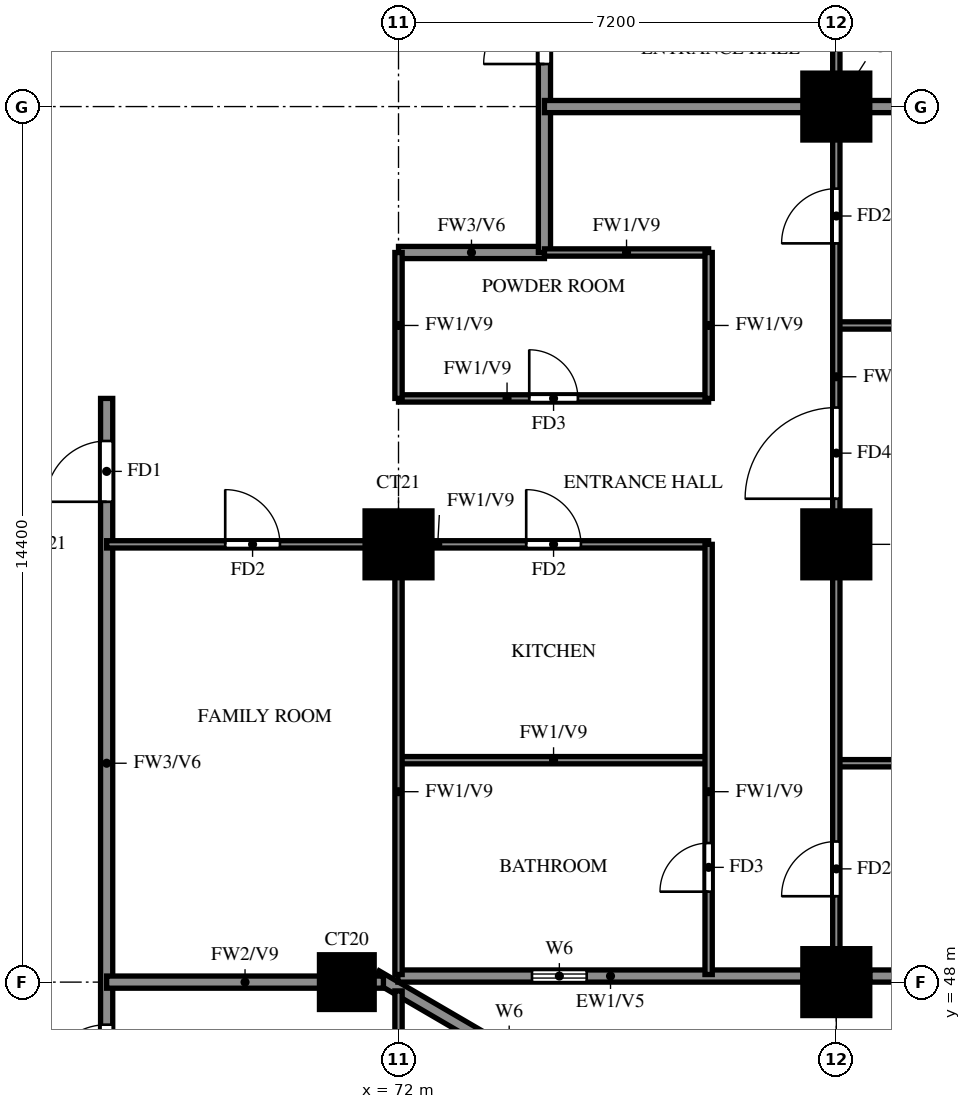
"""IFC4 building model, lengths in metres.
Left out: names, types, materials, properties, quantities, classifications, styles, units other than length and angle.
Written with IfcOpenShell. Run it as: python <this file> out.ifc"""

import sys

from ifc_helpers import new_model, si_unit, direction, frame, frame_2d, origin, origin_2d, place, context, subcontext, project, spatial, rectangle, extrude, source, transform, mapped, element, fill, save


model = new_model("IFC4")
c1 = context("Model", 3, precision=1e-05, world=origin(), true_north=direction((0.0, 1.0)))
c2 = subcontext(c1, "Body", "Model", "MODEL_VIEW")
j1 = project(units=[si_unit("LENGTHUNIT", "METRE"), si_unit("PLANEANGLEUNIT", "RADIAN")], contexts=[c1])
p1 = place(None, origin())
s1 = spatial("IfcSite", under=j1, at=p1, CompositionType="ELEMENT")
p2 = place(p1, origin())
s2 = spatial("IfcBuilding", under=s1, at=p2, CompositionType="ELEMENT")
p3 = place(p2, frame((0.0, 0.0, 134.0)))
s3 = spatial("IfcBuildingStorey", under=s2, at=p3, CompositionType="ELEMENT", Elevation=134.0)
m1 = source(origin(), c2, "Body", "SweptSolid", [
    extrude(rectangle(XDim=0.9, YDim=0.9, at=origin_2d()), origin(), (0.0, 0.0, 1.0), 3.15),
])
p4 = place(p3, frame((71.15, 48.0, 0.0), z_axis=(0.0, 0.0, 1.0), x_axis=(1.0, 0.0, 0.0)))
e1 = element("IfcColumn", 1, at=p4, inside=s3, PredefinedType="COLUMN", context=c2, shape_type="MappedRepresentation", body=[
    mapped(m1, transform((0.0, 0.0, 0.0))),
])
m2 = source(origin(), c2, "Body", "SweptSolid", [
    extrude(rectangle(XDim=1.1, YDim=1.1, at=origin_2d()), origin(), (0.0, 0.0, 1.0), 3.15),
])
for number, where, z_axis, x_axis in (
    (2, (79.2, 48.0, 0.0), (0.0, 0.0, 1.0), (1.0, 0.0, 0.0)),
    (3, (72.0, 55.2, 0.0), (0.0, 0.0, 1.0), (1.0, 0.0, 0.0)),
    (4, (79.2, 55.2, 0.0), (0.0, 0.0, 1.0), (1.0, 0.0, 0.0)),
    (5, (79.2, 62.4, 0.0), (0.0, 0.0, 1.0), (1.0, 0.0, 0.0)),
):
    element("IfcColumn", number, at=place(p3, frame(where, z_axis=z_axis, x_axis=x_axis)), inside=s3, PredefinedType="COLUMN", context=c2, shape_type="MappedRepresentation", body=[
        mapped(m2, transform((0.0, 0.0, 0.0))),
    ])
p5 = place(p3, frame((85.719, 39.881, 0.0), z_axis=(0.0, 0.0, 1.0), x_axis=(-0.86377618652, 0.503875678716, 0.0)))
e6 = element("IfcWall", 6, at=p5, inside=s3, PredefinedType="SOLIDWALL", context=c2, shape_type="SweptSolid", body=[
    extrude(rectangle(XDim=16.311, YDim=0.2, at=frame_2d((8.156, 0.0))), origin(), (0.0, 0.0, 1.0), 3.15),
])
p6 = place(p5, frame((13.326, 0.0, 1.5)))
e7 = element("IfcOpeningElement", 7, at=p6, cuts=e6, PredefinedType="OPENING", context=c2, shape_type="SweptSolid", body=[
    extrude(rectangle(XDim=0.9, YDim=0.9, at=frame_2d((0.45, 0.45))), frame((0.0, 0.11, 0.0), z_axis=(0.0, -1.0, 0.0), x_axis=(1.0, 0.0, 0.0)), (0.0, 0.0, 1.0), 0.22),
])
p7 = place(p3, frame((71.99, 48.1, 0.0), z_axis=(0.0, 0.0, 1.0), x_axis=(1.0, 0.0, 0.0)))
e8 = element("IfcWall", 8, at=p7, inside=s3, PredefinedType="SOLIDWALL", context=c2, shape_type="SweptSolid", body=[
    extrude(rectangle(XDim=6.66, YDim=0.2, at=frame_2d((3.33, 0.0))), origin(), (0.0, 0.0, 1.0), 3.15),
])
p8 = place(p7, frame((2.205, 0.0, 1.5)))
e9 = element("IfcOpeningElement", 9, at=p8, cuts=e8, PredefinedType="OPENING", context=c2, shape_type="SweptSolid", body=[
    extrude(rectangle(XDim=0.9, YDim=0.9, at=frame_2d((0.45, 0.45))), frame((0.0, 0.11, 0.0), z_axis=(0.0, -1.0, 0.0), x_axis=(1.0, 0.0, 0.0)), (0.0, 0.0, 1.0), 0.22),
])
p9 = place(p3, frame((79.75, 48.1, 0.0), z_axis=(0.0, 0.0, 1.0), x_axis=(1.0, 0.0, 0.0)))
e10 = element("IfcWall", 10, at=p9, inside=s3, PredefinedType="SOLIDWALL", context=c2, shape_type="SweptSolid", body=[
    extrude(rectangle(XDim=5.6, YDim=0.2, at=frame_2d((2.8, 0.0))), origin(), (0.0, 0.0, 1.0), 3.15),
])
p10 = place(p9, frame((1.6, 0.0, 0.6)))
e11 = element("IfcOpeningElement", 11, at=p10, cuts=e10, PredefinedType="OPENING", context=c2, shape_type="SweptSolid", body=[
    extrude(rectangle(XDim=2.4, YDim=2.4, at=frame_2d((1.2, 1.2))), frame((0.0, 0.11, 0.0), z_axis=(0.0, -1.0, 0.0), x_axis=(1.0, 0.0, 0.0)), (0.0, 0.0, 1.0), 0.22),
])
p11 = place(p3, frame((72.0, 60.0, 0.0), z_axis=(0.0, 0.0, 1.0), x_axis=(1.0, 0.0, 0.0)))
e12 = element("IfcWall", 12, at=p11, inside=s3, PredefinedType="SOLIDWALL", context=c2, shape_type="SweptSolid", body=[
    extrude(rectangle(XDim=2.4, YDim=0.2, at=frame_2d((1.2, 0.0))), origin(), (0.0, 0.0, 1.0), 3.15),
])
p12 = place(p3, frame((67.2, 45.6, 0.0), z_axis=(0.0, 0.0, 1.0), x_axis=(0.0, 1.0, 0.0)))
e13 = element("IfcWall", 13, at=p12, inside=s3, PredefinedType="SOLIDWALL", context=c2, shape_type="SweptSolid", body=[
    extrude(rectangle(XDim=12.0, YDim=0.2, at=frame_2d((6.0, 0.0))), origin(), (0.0, 0.0, 1.0), 3.15),
])
p13 = place(p12, frame((10.3, 0.0, 0.0)))
e14 = element("IfcOpeningElement", 14, at=p13, cuts=e13, PredefinedType="OPENING", context=c2, shape_type="SweptSolid", body=[
    extrude(rectangle(XDim=1.0, YDim=2.1, at=frame_2d((0.5, 1.05))), frame((0.0, 0.11, 0.0), z_axis=(0.0, -1.0, 0.0), x_axis=(1.0, 0.0, 0.0)), (0.0, 0.0, 1.0), 0.22),
])
p14 = place(p12, frame((0.7, 0.0, 0.0)))
e15 = element("IfcOpeningElement", 15, at=p14, cuts=e13, PredefinedType="OPENING", context=c2, shape_type="SweptSolid", body=[
    extrude(rectangle(XDim=1.0, YDim=2.1, at=frame_2d((0.5, 1.05))), frame((0.0, 0.11, 0.0), z_axis=(0.0, -1.0, 0.0), x_axis=(1.0, 0.0, 0.0)), (0.0, 0.0, 1.0), 0.22),
])
p15 = place(p3, frame((74.4, 60.0, 0.0), z_axis=(0.0, 0.0, 1.0), x_axis=(0.0, 1.0, 0.0)))
e16 = element("IfcWall", 16, at=p15, inside=s3, PredefinedType="SOLIDWALL", context=c2, shape_type="SweptSolid", body=[
    extrude(rectangle(XDim=9.45, YDim=0.2, at=frame_2d((4.725, 0.0))), origin(), (0.0, 0.0, 1.0), 3.15),
])
p16 = place(p15, frame((3.1, 0.0, 0.0)))
e17 = element("IfcOpeningElement", 17, at=p16, cuts=e16, PredefinedType="OPENING", context=c2, shape_type="SweptSolid", body=[
    extrude(rectangle(XDim=1.0, YDim=2.1, at=frame_2d((0.5, 1.05))), frame((0.0, 0.11, 0.0), z_axis=(0.0, -1.0, 0.0), x_axis=(1.0, 0.0, 0.0)), (0.0, 0.0, 1.0), 0.22),
])
p17 = place(p3, frame((67.2, 48.0, 0.0), z_axis=(0.0, 0.0, 1.0), x_axis=(1.0, 0.0, 0.0)))
e18 = element("IfcWall", 18, at=p17, inside=s3, PredefinedType="SOLIDWALL", context=c2, shape_type="SweptSolid", body=[
    extrude(rectangle(XDim=4.552, YDim=0.2, at=frame_2d((2.276, 0.0))), origin(), (0.0, 0.0, 1.0), 3.15),
])
p18 = place(p3, frame((74.4, 62.4, 0.0), z_axis=(0.0, 0.0, 1.0), x_axis=(1.0, 0.0, 0.0)))
e19 = element("IfcWall", 19, at=p18, inside=s3, PredefinedType="SOLIDWALL", context=c2, shape_type="SweptSolid", body=[
    extrude(rectangle(XDim=11.875, YDim=0.2, at=frame_2d((5.938, 0.0))), origin(), (0.0, 0.0, 1.0), 3.15),
])
p19 = place(p3, frame((79.2, 51.6, 0.0), z_axis=(0.0, 0.0, 1.0), x_axis=(1.0, 0.0, 0.0)))
e20 = element("IfcWall", 20, at=p19, inside=s3, PredefinedType="PARTITIONING", context=c2, shape_type="SweptSolid", body=[
    extrude(rectangle(XDim=7.075, YDim=0.12, at=frame_2d((3.538, 0.0))), origin(), (0.0, 0.0, 1.0), 2.25),
])
p20 = place(p3, frame((72.0, 51.65, 0.0), z_axis=(0.0, 0.0, 1.0), x_axis=(1.0, 0.0, 0.0)))
e21 = element("IfcWall", 21, at=p20, inside=s3, PredefinedType="PARTITIONING", context=c2, shape_type="SweptSolid", body=[
    extrude(rectangle(XDim=5.1, YDim=0.12, at=frame_2d((2.55, 0.0))), origin(), (0.0, 0.0, 1.0), 3.15),
])
p21 = place(p3, frame((67.2, 55.2, 0.0), z_axis=(0.0, 0.0, 1.0), x_axis=(1.0, 0.0, 0.0)))
e22 = element("IfcWall", 22, at=p21, inside=s3, PredefinedType="PARTITIONING", context=c2, shape_type="SweptSolid", body=[
    extrude(rectangle(XDim=9.9, YDim=0.12, at=frame_2d((4.95, 0.0))), origin(), (0.0, 0.0, 1.0), 3.15),
])
p22 = place(p21, frame((6.9, 0.0, 0.0)))
e23 = element("IfcOpeningElement", 23, at=p22, cuts=e22, PredefinedType="OPENING", context=c2, shape_type="SweptSolid", body=[
    extrude(rectangle(XDim=0.9, YDim=2.1, at=frame_2d((0.45, 1.05))), frame((0.0, 0.07, 0.0), z_axis=(0.0, -1.0, 0.0), x_axis=(1.0, 0.0, 0.0)), (0.0, 0.0, 1.0), 0.14),
])
p23 = place(p21, frame((1.95, 0.0, 0.0)))
e24 = element("IfcOpeningElement", 24, at=p23, cuts=e22, PredefinedType="OPENING", context=c2, shape_type="SweptSolid", body=[
    extrude(rectangle(XDim=0.9, YDim=2.1, at=frame_2d((0.45, 1.05))), frame((0.0, 0.07, 0.0), z_axis=(0.0, -1.0, 0.0), x_axis=(1.0, 0.0, 0.0)), (0.0, 0.0, 1.0), 0.14),
])
p24 = place(p3, frame((72.0, 57.6, 0.0), z_axis=(0.0, 0.0, 1.0), x_axis=(1.0, 0.0, 0.0)))
e25 = element("IfcWall", 25, at=p24, inside=s3, PredefinedType="PARTITIONING", context=c2, shape_type="SweptSolid", body=[
    extrude(rectangle(XDim=5.1, YDim=0.12, at=frame_2d((2.55, 0.0))), origin(), (0.0, 0.0, 1.0), 3.15),
])
p25 = place(p24, frame((2.15, 0.0, 0.0)))
e26 = element("IfcOpeningElement", 26, at=p25, cuts=e25, PredefinedType="OPENING", context=c2, shape_type="SweptSolid", body=[
    extrude(rectangle(XDim=0.8, YDim=2.1, at=frame_2d((0.4, 1.05))), frame((0.0, 0.07, 0.0), z_axis=(0.0, -1.0, 0.0), x_axis=(1.0, 0.0, 0.0)), (0.0, 0.0, 1.0), 0.14),
])
p26 = place(p3, frame((79.2, 58.8, 0.0), z_axis=(0.0, 0.0, 1.0), x_axis=(1.0, 0.0, 0.0)))
e27 = element("IfcWall", 27, at=p26, inside=s3, PredefinedType="PARTITIONING", context=c2, shape_type="SweptSolid", body=[
    extrude(rectangle(XDim=7.075, YDim=0.12, at=frame_2d((3.538, 0.0))), origin(), (0.0, 0.0, 1.0), 2.25),
])
p27 = place(p3, frame((74.4, 60.0, 0.0), z_axis=(0.0, 0.0, 1.0), x_axis=(1.0, 0.0, 0.0)))
e28 = element("IfcWall", 28, at=p27, inside=s3, PredefinedType="PARTITIONING", context=c2, shape_type="SweptSolid", body=[
    extrude(rectangle(XDim=2.7, YDim=0.12, at=frame_2d((1.35, 0.0))), origin(), (0.0, 0.0, 1.0), 3.15),
])
p28 = place(p3, frame((72.0, 39.725, 0.0), z_axis=(0.0, 0.0, 1.0), x_axis=(0.0, 1.0, 0.0)))
e29 = element("IfcWall", 29, at=p28, inside=s3, PredefinedType="PARTITIONING", context=c2, shape_type="SweptSolid", body=[
    extrude(rectangle(XDim=8.13, YDim=0.12, at=frame_2d((4.065, 0.0))), origin(), (0.0, 0.0, 1.0), 2.25),
])
p29 = place(p28, frame((1.788, 0.0, 0.0)))
e30 = element("IfcOpeningElement", 30, at=p29, cuts=e29, PredefinedType="OPENING", context=c2, shape_type="SweptSolid", body=[
    extrude(rectangle(XDim=0.9, YDim=2.1, at=frame_2d((0.45, 1.05))), frame((0.0, 0.07, 0.0), z_axis=(0.0, -1.0, 0.0), x_axis=(1.0, 0.0, 0.0)), (0.0, 0.0, 1.0), 0.14),
])
p30 = place(p28, frame((4.575, 0.0, 0.0)))
e31 = element("IfcOpeningElement", 31, at=p30, cuts=e29, PredefinedType="OPENING", context=c2, shape_type="SweptSolid", body=[
    extrude(rectangle(XDim=0.8, YDim=2.1, at=frame_2d((0.4, 1.05))), frame((0.0, 0.07, 0.0), z_axis=(0.0, -1.0, 0.0), x_axis=(1.0, 0.0, 0.0)), (0.0, 0.0, 1.0), 0.14),
])
p31 = place(p3, frame((72.0, 48.125, 0.0), z_axis=(0.0, 0.0, 1.0), x_axis=(0.0, 1.0, 0.0)))
e32 = element("IfcWall", 32, at=p31, inside=s3, PredefinedType="PARTITIONING", context=c2, shape_type="SweptSolid", body=[
    extrude(rectangle(XDim=7.075, YDim=0.12, at=frame_2d((3.538, 0.0))), origin(), (0.0, 0.0, 1.0), 3.15),
])
p32 = place(p3, frame((72.0, 57.6, 0.0), z_axis=(0.0, 0.0, 1.0), x_axis=(0.0, 1.0, 0.0)))
e33 = element("IfcWall", 33, at=p32, inside=s3, PredefinedType="PARTITIONING", context=c2, shape_type="SweptSolid", body=[
    extrude(rectangle(XDim=2.4, YDim=0.12, at=frame_2d((1.2, 0.0))), origin(), (0.0, 0.0, 1.0), 3.15),
])
p33 = place(p3, frame((77.1, 48.125, 0.0), z_axis=(0.0, 0.0, 1.0), x_axis=(0.0, 1.0, 0.0)))
e34 = element("IfcWall", 34, at=p33, inside=s3, PredefinedType="PARTITIONING", context=c2, shape_type="SweptSolid", body=[
    extrude(rectangle(XDim=7.075, YDim=0.12, at=frame_2d((3.538, 0.0))), origin(), (0.0, 0.0, 1.0), 3.15),
])
p34 = place(p33, frame((1.363, 0.0, 0.0)))
e35 = element("IfcOpeningElement", 35, at=p34, cuts=e34, PredefinedType="OPENING", context=c2, shape_type="SweptSolid", body=[
    extrude(rectangle(XDim=0.8, YDim=2.1, at=frame_2d((0.4, 1.05))), frame((0.0, 0.07, 0.0), z_axis=(0.0, -1.0, 0.0), x_axis=(1.0, 0.0, 0.0)), (0.0, 0.0, 1.0), 0.14),
])
p35 = place(p3, frame((77.1, 57.6, 0.0), z_axis=(0.0, 0.0, 1.0), x_axis=(0.0, 1.0, 0.0)))
e36 = element("IfcWall", 36, at=p35, inside=s3, PredefinedType="PARTITIONING", context=c2, shape_type="SweptSolid", body=[
    extrude(rectangle(XDim=2.4, YDim=0.12, at=frame_2d((1.2, 0.0))), origin(), (0.0, 0.0, 1.0), 3.15),
])
p36 = place(p3, frame((79.2, 48.125, 0.0), z_axis=(0.0, 0.0, 1.0), x_axis=(0.0, 1.0, 0.0)))
e37 = element("IfcWall", 37, at=p36, inside=s3, PredefinedType="PARTITIONING", context=c2, shape_type="SweptSolid", body=[
    extrude(rectangle(XDim=17.875, YDim=0.12, at=frame_2d((8.938, 0.0))), origin(), (0.0, 0.0, 1.0), 3.15),
])
p37 = place(p36, frame((1.288, 0.0, 0.0)))
e38 = element("IfcOpeningElement", 38, at=p37, cuts=e37, PredefinedType="OPENING", context=c2, shape_type="SweptSolid", body=[
    extrude(rectangle(XDim=0.9, YDim=2.1, at=frame_2d((0.45, 1.05))), frame((0.0, 0.07, 0.0), z_axis=(0.0, -1.0, 0.0), x_axis=(1.0, 0.0, 0.0)), (0.0, 0.0, 1.0), 0.14),
])
p38 = place(p36, frame((7.825, 0.0, 0.0)))
e39 = element("IfcOpeningElement", 39, at=p38, cuts=e37, PredefinedType="OPENING", context=c2, shape_type="SweptSolid", body=[
    extrude(rectangle(XDim=1.5, YDim=2.1, at=frame_2d((0.75, 1.05))), frame((0.0, 0.07, 0.0), z_axis=(0.0, -1.0, 0.0), x_axis=(1.0, 0.0, 0.0)), (0.0, 0.0, 1.0), 0.14),
])
p39 = place(p36, frame((12.025, 0.0, 0.0)))
e40 = element("IfcOpeningElement", 40, at=p39, cuts=e37, PredefinedType="OPENING", context=c2, shape_type="SweptSolid", body=[
    extrude(rectangle(XDim=0.9, YDim=2.1, at=frame_2d((0.45, 1.05))), frame((0.0, 0.07, 0.0), z_axis=(0.0, -1.0, 0.0), x_axis=(1.0, 0.0, 0.0)), (0.0, 0.0, 1.0), 0.14),
])
p40 = place(p36, frame((15.625, 0.0, 0.0)))
e41 = element("IfcOpeningElement", 41, at=p40, cuts=e37, PredefinedType="OPENING", context=c2, shape_type="SweptSolid", body=[
    extrude(rectangle(XDim=0.9, YDim=2.1, at=frame_2d((0.45, 1.05))), frame((0.0, 0.07, 0.0), z_axis=(0.0, -1.0, 0.0), x_axis=(1.0, 0.0, 0.0)), (0.0, 0.0, 1.0), 0.14),
])
p41 = place(p8, origin())
e42 = element("IfcWindow", 42, at=p41, inside=s3, PartitioningType="SINGLE_PANEL", PredefinedType="WINDOW", context=c2, shape_type="SweptSolid", body=[
    extrude(rectangle(XDim=0.9, YDim=0.9, at=frame_2d((0.45, 0.45))), frame((0.0, 0.03, 0.0), z_axis=(0.0, -1.0, 0.0), x_axis=(1.0, 0.0, 0.0)), (0.0, 0.0, 1.0), 0.06),
])
fill(e9, e42)
p42 = place(p13, origin())
e43 = element("IfcDoor", 43, at=p42, inside=s3, OperationType="SINGLE_SWING_LEFT", PredefinedType="DOOR", context=c2, shape_type="SweptSolid", body=[
    extrude(rectangle(XDim=1.0, YDim=2.1, at=frame_2d((0.5, 1.05))), frame((0.0, 0.025, 0.0), z_axis=(0.0, -1.0, 0.0), x_axis=(1.0, 0.0, 0.0)), (0.0, 0.0, 1.0), 0.05),
])
fill(e14, e43)
p43 = place(p37, origin())
e44 = element("IfcDoor", 44, at=p43, inside=s3, OperationType="SINGLE_SWING_RIGHT", PredefinedType="DOOR", context=c2, shape_type="SweptSolid", body=[
    extrude(rectangle(XDim=0.9, YDim=2.1, at=frame_2d((0.45, 1.05))), frame((0.0, 0.025, 0.0), z_axis=(0.0, -1.0, 0.0), x_axis=(1.0, 0.0, 0.0)), (0.0, 0.0, 1.0), 0.05),
])
fill(e38, e44)
p44 = place(p38, origin())
e45 = element("IfcDoor", 45, at=p44, inside=s3, OperationType="SINGLE_SWING_RIGHT", PredefinedType="DOOR", context=c2, shape_type="SweptSolid", body=[
    extrude(rectangle(XDim=1.5, YDim=2.1, at=frame_2d((0.75, 1.05))), frame((0.0, 0.025, 0.0), z_axis=(0.0, -1.0, 0.0), x_axis=(1.0, 0.0, 0.0)), (0.0, 0.0, 1.0), 0.05),
])
fill(e39, e45)
p45 = place(p39, origin())
e46 = element("IfcDoor", 46, at=p45, inside=s3, OperationType="SINGLE_SWING_LEFT", PredefinedType="DOOR", context=c2, shape_type="SweptSolid", body=[
    extrude(rectangle(XDim=0.9, YDim=2.1, at=frame_2d((0.45, 1.05))), frame((0.0, 0.025, 0.0), z_axis=(0.0, -1.0, 0.0), x_axis=(1.0, 0.0, 0.0)), (0.0, 0.0, 1.0), 0.05),
])
fill(e40, e46)
p46 = place(p34, origin())
e47 = element("IfcDoor", 47, at=p46, inside=s3, OperationType="SINGLE_SWING_RIGHT", PredefinedType="DOOR", context=c2, shape_type="SweptSolid", body=[
    extrude(rectangle(XDim=0.8, YDim=2.1, at=frame_2d((0.4, 1.05))), frame((0.0, 0.025, 0.0), z_axis=(0.0, -1.0, 0.0), x_axis=(1.0, 0.0, 0.0)), (0.0, 0.0, 1.0), 0.05),
])
fill(e35, e47)
p47 = place(p22, origin())
e48 = element("IfcDoor", 48, at=p47, inside=s3, OperationType="SINGLE_SWING_LEFT", PredefinedType="DOOR", context=c2, shape_type="SweptSolid", body=[
    extrude(rectangle(XDim=0.9, YDim=2.1, at=frame_2d((0.45, 1.05))), frame((0.0, 0.025, 0.0), z_axis=(0.0, -1.0, 0.0), x_axis=(1.0, 0.0, 0.0)), (0.0, 0.0, 1.0), 0.05),
])
fill(e23, e48)
p48 = place(p25, origin())
e49 = element("IfcDoor", 49, at=p48, inside=s3, OperationType="SINGLE_SWING_LEFT", PredefinedType="DOOR", context=c2, shape_type="SweptSolid", body=[
    extrude(rectangle(XDim=0.8, YDim=2.1, at=frame_2d((0.4, 1.05))), frame((0.0, 0.025, 0.0), z_axis=(0.0, -1.0, 0.0), x_axis=(1.0, 0.0, 0.0)), (0.0, 0.0, 1.0), 0.05),
])
fill(e26, e49)
p49 = place(p23, origin())
e50 = element("IfcDoor", 50, at=p49, inside=s3, OperationType="SINGLE_SWING_RIGHT", PredefinedType="DOOR", context=c2, shape_type="SweptSolid", body=[
    extrude(rectangle(XDim=0.9, YDim=2.1, at=frame_2d((0.45, 1.05))), frame((0.0, 0.025, 0.0), z_axis=(0.0, -1.0, 0.0), x_axis=(1.0, 0.0, 0.0)), (0.0, 0.0, 1.0), 0.05),
])
fill(e24, e50)
p50 = place(p16, origin())
e51 = element("IfcDoor", 51, at=p50, inside=s3, OperationType="SINGLE_SWING_RIGHT", PredefinedType="DOOR", context=c2, shape_type="SweptSolid", body=[
    extrude(rectangle(XDim=1.0, YDim=2.1, at=frame_2d((0.5, 1.05))), frame((0.0, 0.025, 0.0), z_axis=(0.0, -1.0, 0.0), x_axis=(1.0, 0.0, 0.0)), (0.0, 0.0, 1.0), 0.05),
])
fill(e17, e51)
p51 = place(p14, origin())
e52 = element("IfcDoor", 52, at=p51, inside=s3, OperationType="SINGLE_SWING_RIGHT", PredefinedType="DOOR", context=c2, shape_type="SweptSolid", body=[
    extrude(rectangle(XDim=1.0, YDim=2.1, at=frame_2d((0.5, 1.05))), frame((0.0, 0.025, 0.0), z_axis=(0.0, -1.0, 0.0), x_axis=(1.0, 0.0, 0.0)), (0.0, 0.0, 1.0), 0.05),
])
fill(e15, e52)
save(model, sys.argv[1])
